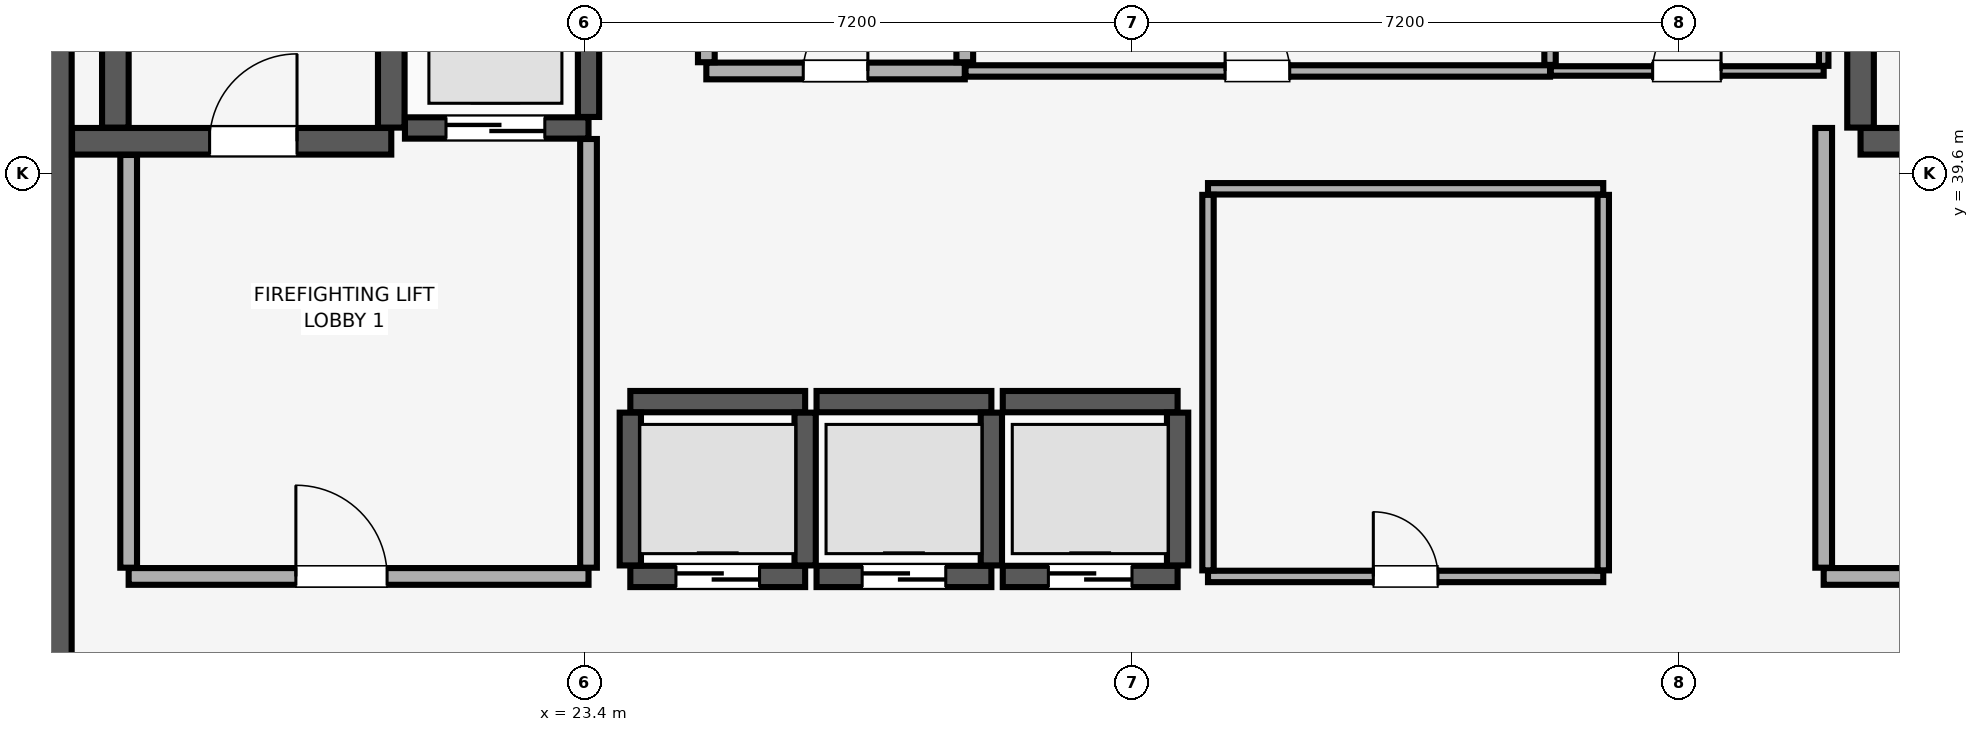
"""IFC4 building model, lengths in metres.
Left out: names, types, materials, properties, quantities, classifications, styles, units other than length and angle.
Written with IfcOpenShell. Run it as: python <this file> out.ifc"""

import sys

from ifc_helpers import new_model, si_unit, direction, frame, frame_2d, origin, place, context, subcontext, project, spatial, rectangle, extrude, element, fill, save


model = new_model("IFC4")
c1 = context("Model", 3, precision=1e-05, world=origin(), true_north=direction((0.0, 1.0)))
c2 = subcontext(c1, "Body", "Model", "MODEL_VIEW")
j1 = project(units=[si_unit("LENGTHUNIT", "METRE"), si_unit("PLANEANGLEUNIT", "RADIAN")], contexts=[c1])
p1 = place(None, origin())
s1 = spatial("IfcSite", under=j1, at=p1, CompositionType="ELEMENT")
p2 = place(p1, origin())
s2 = spatial("IfcBuilding", under=s1, at=p2, CompositionType="ELEMENT")
p3 = place(p2, frame((0.0, 0.0, 224.35)))
s3 = spatial("IfcBuildingStorey", under=s2, at=p3, CompositionType="ELEMENT", Elevation=224.35)
p4 = place(p3, frame((16.2, 29.4, 0.0), z_axis=(0.0, 0.0, 1.0), x_axis=(0.0, 1.0, 0.0)))
e1 = element("IfcWall", 1, at=p4, inside=s3, PredefinedType="SHEAR", context=c2, shape_type="SweptSolid", body=[
    extrude(rectangle(XDim=19.2, YDim=0.9, at=frame_2d((9.6, 0.0))), origin(), (0.0, 0.0, 1.0), 4.52),
])
p5 = place(p3, frame((16.655, 40.025, 0.0), z_axis=(0.0, 0.0, 1.0), x_axis=(1.0, 0.0, 0.0)))
e2 = element("IfcWall", 2, at=p5, inside=s3, PredefinedType="SHEAR", context=c2, shape_type="SweptSolid", body=[
    extrude(rectangle(XDim=4.2, YDim=0.35, at=frame_2d((2.1, 0.0))), origin(), (0.0, 0.0, 1.0), 4.52),
])
p6 = place(p5, frame((1.81, 0.0, 0.0)))
e3 = element("IfcOpeningElement", 3, at=p6, cuts=e2, PredefinedType="OPENING", context=c2, shape_type="SweptSolid", body=[
    extrude(rectangle(XDim=1.15, YDim=2.15, at=frame_2d((0.575, 1.075))), frame((0.0, 0.185, 0.0), z_axis=(0.0, -1.0, 0.0), x_axis=(1.0, 0.0, 0.0)), (0.0, 0.0, 1.0), 0.37),
])
for number, where, z_axis, x_axis in (
    (4, (17.225, 40.205, 0.0), (0.0, 0.0, 1.0), (0.0, 1.0, 0.0)),
    (5, (20.855, 40.205, 0.0), (0.0, 0.0, 1.0), (0.0, 1.0, 0.0)),
):
    element("IfcWall", number, at=place(p3, frame(where, z_axis=z_axis, x_axis=x_axis)), inside=s3, PredefinedType="SHEAR", context=c2, shape_type="SweptSolid", body=[
        extrude(rectangle(XDim=8.09, YDim=0.35, at=frame_2d((4.045, 0.0))), origin(), (0.0, 0.0, 1.0), 4.52),
    ])
p7 = place(p3, frame((40.185, 40.025, 0.0), z_axis=(0.0, 0.0, 1.0), x_axis=(1.0, 0.0, 0.0)))
e6 = element("IfcWall", 6, at=p7, inside=s3, PredefinedType="SHEAR", context=c2, shape_type="SweptSolid", body=[
    extrude(rectangle(XDim=3.63, YDim=0.35, at=frame_2d((1.815, 0.0))), origin(), (0.0, 0.0, 1.0), 4.52),
])
p8 = place(p7, frame((1.24, 0.0, 0.0)))
e7 = element("IfcOpeningElement", 7, at=p8, cuts=e6, PredefinedType="OPENING", context=c2, shape_type="SweptSolid", body=[
    extrude(rectangle(XDim=1.15, YDim=2.15, at=frame_2d((0.575, 1.075))), frame((0.0, 0.185, 0.0), z_axis=(0.0, -1.0, 0.0), x_axis=(1.0, 0.0, 0.0)), (0.0, 0.0, 1.0), 0.37),
])
p9 = place(p3, frame((40.185, 40.205, 0.0), z_axis=(0.0, 0.0, 1.0), x_axis=(0.0, 1.0, 0.0)))
e8 = element("IfcWall", 8, at=p9, inside=s3, PredefinedType="SHEAR", context=c2, shape_type="SweptSolid", body=[
    extrude(rectangle(XDim=8.09, YDim=0.35, at=frame_2d((4.045, 0.0))), origin(), (0.0, 0.0, 1.0), 4.52),
])
p10 = place(p3, frame((24.0, 34.3, 0.0), z_axis=(0.0, 0.0, 1.0), x_axis=(1.0, 0.0, 0.0)))
e9 = element("IfcWall", 9, at=p10, inside=s3, PredefinedType="SHEAR", context=c2, shape_type="SweptSolid", body=[
    extrude(rectangle(XDim=2.3, YDim=0.28, at=frame_2d((1.15, 0.0))), origin(), (0.0, 0.0, 1.0), 4.52),
])
p11 = place(p10, frame((0.6, 0.0, 0.0)))
e10 = element("IfcOpeningElement", 10, at=p11, cuts=e9, PredefinedType="OPENING", context=c2, shape_type="SweptSolid", body=[
    extrude(rectangle(XDim=1.1, YDim=2.2, at=frame_2d((0.55, 1.1))), frame((0.0, 0.15, 0.0), z_axis=(0.0, -1.0, 0.0), x_axis=(1.0, 0.0, 0.0)), (0.0, 0.0, 1.0), 0.3),
])
p12 = place(p3, frame((24.0, 36.6, 0.0), z_axis=(0.0, 0.0, 1.0), x_axis=(1.0, 0.0, 0.0)))
e11 = element("IfcWall", 11, at=p12, inside=s3, PredefinedType="SHEAR", context=c2, shape_type="SweptSolid", body=[
    extrude(rectangle(XDim=2.3, YDim=0.28, at=frame_2d((1.15, 0.0))), origin(), (0.0, 0.0, 1.0), 4.52),
])
for number, where, z_axis, x_axis in (
    (12, (24.0, 34.445, 0.0), (0.0, 0.0, 1.0), (0.0, 1.0, 0.0)),
    (13, (26.3, 34.445, 0.0), (0.0, 0.0, 1.0), (0.0, 1.0, 0.0)),
):
    element("IfcWall", number, at=place(p3, frame(where, z_axis=z_axis, x_axis=x_axis)), inside=s3, PredefinedType="SHEAR", context=c2, shape_type="SweptSolid", body=[
        extrude(rectangle(XDim=2.01, YDim=0.28, at=frame_2d((1.005, 0.0))), origin(), (0.0, 0.0, 1.0), 4.52),
    ])
p13 = place(p3, frame((26.45, 34.3, 0.0), z_axis=(0.0, 0.0, 1.0), x_axis=(1.0, 0.0, 0.0)))
e14 = element("IfcWall", 14, at=p13, inside=s3, PredefinedType="SHEAR", context=c2, shape_type="SweptSolid", body=[
    extrude(rectangle(XDim=2.3, YDim=0.28, at=frame_2d((1.15, 0.0))), origin(), (0.0, 0.0, 1.0), 4.52),
])
p14 = place(p13, frame((0.6, 0.0, 0.0)))
e15 = element("IfcOpeningElement", 15, at=p14, cuts=e14, PredefinedType="OPENING", context=c2, shape_type="SweptSolid", body=[
    extrude(rectangle(XDim=1.1, YDim=2.2, at=frame_2d((0.55, 1.1))), frame((0.0, 0.15, 0.0), z_axis=(0.0, -1.0, 0.0), x_axis=(1.0, 0.0, 0.0)), (0.0, 0.0, 1.0), 0.3),
])
p15 = place(p3, frame((26.45, 36.6, 0.0), z_axis=(0.0, 0.0, 1.0), x_axis=(1.0, 0.0, 0.0)))
e16 = element("IfcWall", 16, at=p15, inside=s3, PredefinedType="SHEAR", context=c2, shape_type="SweptSolid", body=[
    extrude(rectangle(XDim=2.3, YDim=0.28, at=frame_2d((1.15, 0.0))), origin(), (0.0, 0.0, 1.0), 4.52),
])
p16 = place(p3, frame((28.75, 34.445, 0.0), z_axis=(0.0, 0.0, 1.0), x_axis=(0.0, 1.0, 0.0)))
e17 = element("IfcWall", 17, at=p16, inside=s3, PredefinedType="SHEAR", context=c2, shape_type="SweptSolid", body=[
    extrude(rectangle(XDim=2.01, YDim=0.28, at=frame_2d((1.005, 0.0))), origin(), (0.0, 0.0, 1.0), 4.52),
])
p17 = place(p3, frame((28.9, 34.3, 0.0), z_axis=(0.0, 0.0, 1.0), x_axis=(1.0, 0.0, 0.0)))
e18 = element("IfcWall", 18, at=p17, inside=s3, PredefinedType="SHEAR", context=c2, shape_type="SweptSolid", body=[
    extrude(rectangle(XDim=2.3, YDim=0.28, at=frame_2d((1.15, 0.0))), origin(), (0.0, 0.0, 1.0), 4.52),
])
p18 = place(p17, frame((0.6, 0.0, 0.0)))
e19 = element("IfcOpeningElement", 19, at=p18, cuts=e18, PredefinedType="OPENING", context=c2, shape_type="SweptSolid", body=[
    extrude(rectangle(XDim=1.1, YDim=2.2, at=frame_2d((0.55, 1.1))), frame((0.0, 0.15, 0.0), z_axis=(0.0, -1.0, 0.0), x_axis=(1.0, 0.0, 0.0)), (0.0, 0.0, 1.0), 0.3),
])
p19 = place(p3, frame((28.9, 36.6, 0.0), z_axis=(0.0, 0.0, 1.0), x_axis=(1.0, 0.0, 0.0)))
e20 = element("IfcWall", 20, at=p19, inside=s3, PredefinedType="SHEAR", context=c2, shape_type="SweptSolid", body=[
    extrude(rectangle(XDim=2.3, YDim=0.28, at=frame_2d((1.15, 0.0))), origin(), (0.0, 0.0, 1.0), 4.52),
])
p20 = place(p3, frame((31.2, 34.445, 0.0), z_axis=(0.0, 0.0, 1.0), x_axis=(0.0, 1.0, 0.0)))
e21 = element("IfcWall", 21, at=p20, inside=s3, PredefinedType="SHEAR", context=c2, shape_type="SweptSolid", body=[
    extrude(rectangle(XDim=2.01, YDim=0.28, at=frame_2d((1.005, 0.0))), origin(), (0.0, 0.0, 1.0), 4.52),
])
p21 = place(p3, frame((21.035, 40.2, 0.0), z_axis=(0.0, 0.0, 1.0), x_axis=(1.0, 0.0, 0.0)))
e22 = element("IfcWall", 22, at=p21, inside=s3, PredefinedType="SHEAR", context=c2, shape_type="SweptSolid", body=[
    extrude(rectangle(XDim=2.415, YDim=0.28, at=frame_2d((1.208, 0.0))), origin(), (0.0, 0.0, 1.0), 4.52),
])
p22 = place(p21, frame((0.54, 0.0, 0.0)))
e23 = element("IfcOpeningElement", 23, at=p22, cuts=e22, PredefinedType="OPENING", context=c2, shape_type="SweptSolid", body=[
    extrude(rectangle(XDim=1.3, YDim=2.3, at=frame_2d((0.65, 1.15))), frame((0.0, 0.15, 0.0), z_axis=(0.0, -1.0, 0.0), x_axis=(1.0, 0.0, 0.0)), (0.0, 0.0, 1.0), 0.3),
])
p23 = place(p3, frame((23.45, 40.345, 0.0), z_axis=(0.0, 0.0, 1.0), x_axis=(0.0, 1.0, 0.0)))
e24 = element("IfcWall", 24, at=p23, inside=s3, PredefinedType="SHEAR", context=c2, shape_type="SweptSolid", body=[
    extrude(rectangle(XDim=2.81, YDim=0.28, at=frame_2d((1.405, 0.0))), origin(), (0.0, 0.0, 1.0), 4.52),
])
p24 = place(p3, frame((17.4, 34.3, 0.0), z_axis=(0.0, 0.0, 1.0), x_axis=(1.0, 0.0, 0.0)))
e25 = element("IfcWall", 25, at=p24, inside=s3, PredefinedType="PARTITIONING", context=c2, shape_type="SweptSolid", body=[
    extrude(rectangle(XDim=6.05, YDim=0.22, at=frame_2d((3.025, 0.0))), origin(), (0.0, 0.0, 1.0), 4.52),
])
p25 = place(p24, frame((2.2, 0.0, 0.0)))
e26 = element("IfcOpeningElement", 26, at=p25, cuts=e25, PredefinedType="OPENING", context=c2, shape_type="SweptSolid", body=[
    extrude(rectangle(XDim=1.2, YDim=2.15, at=frame_2d((0.6, 1.075))), frame((0.0, 0.12, 0.0), z_axis=(0.0, -1.0, 0.0), x_axis=(1.0, 0.0, 0.0)), (0.0, 0.0, 1.0), 0.24),
])
p26 = place(p3, frame((17.4, 34.415, 0.0), z_axis=(0.0, 0.0, 1.0), x_axis=(0.0, 1.0, 0.0)))
e27 = element("IfcWall", 27, at=p26, inside=s3, PredefinedType="PARTITIONING", context=c2, shape_type="SweptSolid", body=[
    extrude(rectangle(XDim=5.43, YDim=0.22, at=frame_2d((2.715, 0.0))), origin(), (0.0, 0.0, 1.0), 4.52),
])
p27 = place(p3, frame((23.45, 34.415, 0.0), z_axis=(0.0, 0.0, 1.0), x_axis=(0.0, 1.0, 0.0)))
e28 = element("IfcWall", 28, at=p27, inside=s3, PredefinedType="PARTITIONING", context=c2, shape_type="SweptSolid", body=[
    extrude(rectangle(XDim=5.64, YDim=0.22, at=frame_2d((2.82, 0.0))), origin(), (0.0, 0.0, 1.0), 4.52),
])
p28 = place(p3, frame((39.7, 34.3, 0.0), z_axis=(0.0, 0.0, 1.0), x_axis=(1.0, 0.0, 0.0)))
e29 = element("IfcWall", 29, at=p28, inside=s3, PredefinedType="PARTITIONING", context=c2, shape_type="SweptSolid", body=[
    extrude(rectangle(XDim=4.6, YDim=0.22, at=frame_2d((2.3, 0.0))), origin(), (0.0, 0.0, 1.0), 4.52),
])
p29 = place(p28, frame((1.7, 0.0, 0.0)))
e30 = element("IfcOpeningElement", 30, at=p29, cuts=e29, PredefinedType="OPENING", context=c2, shape_type="SweptSolid", body=[
    extrude(rectangle(XDim=1.2, YDim=2.15, at=frame_2d((0.6, 1.075))), frame((0.0, 0.12, 0.0), z_axis=(0.0, -1.0, 0.0), x_axis=(1.0, 0.0, 0.0)), (0.0, 0.0, 1.0), 0.24),
])
p30 = place(p3, frame((39.7, 34.415, 0.0), z_axis=(0.0, 0.0, 1.0), x_axis=(0.0, 1.0, 0.0)))
e31 = element("IfcWall", 31, at=p30, inside=s3, PredefinedType="PARTITIONING", context=c2, shape_type="SweptSolid", body=[
    extrude(rectangle(XDim=5.785, YDim=0.22, at=frame_2d((2.893, 0.0))), origin(), (0.0, 0.0, 1.0), 4.52),
])
p31 = place(p3, frame((31.6, 34.3, 0.0), z_axis=(0.0, 0.0, 1.0), x_axis=(1.0, 0.0, 0.0)))
e32 = element("IfcWall", 32, at=p31, inside=s3, PredefinedType="PARTITIONING", context=c2, shape_type="SweptSolid", body=[
    extrude(rectangle(XDim=5.2, YDim=0.15, at=frame_2d((2.6, 0.0))), origin(), (0.0, 0.0, 1.0), 4.52),
])
p32 = place(p31, frame((2.175, 0.0, 0.0)))
e33 = element("IfcOpeningElement", 33, at=p32, cuts=e32, PredefinedType="OPENING", context=c2, shape_type="SweptSolid", body=[
    extrude(rectangle(XDim=0.85, YDim=2.1, at=frame_2d((0.425, 1.05))), frame((0.0, 0.085, 0.0), z_axis=(0.0, -1.0, 0.0), x_axis=(1.0, 0.0, 0.0)), (0.0, 0.0, 1.0), 0.17),
])
p33 = place(p3, frame((31.6, 39.4, 0.0), z_axis=(0.0, 0.0, 1.0), x_axis=(1.0, 0.0, 0.0)))
e34 = element("IfcWall", 34, at=p33, inside=s3, PredefinedType="PARTITIONING", context=c2, shape_type="SweptSolid", body=[
    extrude(rectangle(XDim=5.2, YDim=0.15, at=frame_2d((2.6, 0.0))), origin(), (0.0, 0.0, 1.0), 4.52),
])
for number, where, z_axis, x_axis in (
    (35, (31.6, 34.38, 0.0), (0.0, 0.0, 1.0), (0.0, 1.0, 0.0)),
    (36, (36.8, 34.38, 0.0), (0.0, 0.0, 1.0), (0.0, 1.0, 0.0)),
):
    element("IfcWall", number, at=place(p3, frame(where, z_axis=z_axis, x_axis=x_axis)), inside=s3, PredefinedType="PARTITIONING", context=c2, shape_type="SweptSolid", body=[
        extrude(rectangle(XDim=4.94, YDim=0.15, at=frame_2d((2.47, 0.0))), origin(), (0.0, 0.0, 1.0), 4.52),
    ])
p34 = place(p3, frame((25.0, 40.95, 0.0), z_axis=(0.0, 0.0, 1.0), x_axis=(1.0, 0.0, 0.0)))
e37 = element("IfcWall", 37, at=p34, inside=s3, PredefinedType="PARTITIONING", context=c2, shape_type="SweptSolid", body=[
    extrude(rectangle(XDim=3.4, YDim=0.22, at=frame_2d((1.7, 0.0))), origin(), (0.0, 0.0, 1.0), 4.52),
])
p35 = place(p34, frame((1.275, 0.0, 0.0)))
e38 = element("IfcOpeningElement", 38, at=p35, cuts=e37, PredefinedType="OPENING", context=c2, shape_type="SweptSolid", body=[
    extrude(rectangle(XDim=0.85, YDim=2.1, at=frame_2d((0.425, 1.05))), frame((0.0, 0.12, 0.0), z_axis=(0.0, -1.0, 0.0), x_axis=(1.0, 0.0, 0.0)), (0.0, 0.0, 1.0), 0.24),
])
for number, where, z_axis, x_axis in (
    (39, (25.0, 41.065, 0.0), (0.0, 0.0, 1.0), (0.0, 1.0, 0.0)),
    (40, (28.4, 41.065, 0.0), (0.0, 0.0, 1.0), (0.0, 1.0, 0.0)),
):
    element("IfcWall", number, at=place(p3, frame(where, z_axis=z_axis, x_axis=x_axis)), inside=s3, PredefinedType="PARTITIONING", context=c2, shape_type="SweptSolid", body=[
        extrude(rectangle(XDim=7.785, YDim=0.22, at=frame_2d((3.893, 0.0))), origin(), (0.0, 0.0, 1.0), 4.52),
    ])
p36 = place(p3, frame((28.41, 40.95, 0.0), z_axis=(0.0, 0.0, 1.0), x_axis=(1.0, 0.0, 0.0)))
e41 = element("IfcWall", 41, at=p36, inside=s3, PredefinedType="PARTITIONING", context=c2, shape_type="SweptSolid", body=[
    extrude(rectangle(XDim=7.69, YDim=0.15, at=frame_2d((3.845, 0.0))), origin(), (0.0, 0.0, 1.0), 4.52),
])
p37 = place(p36, frame((3.415, 0.0, 0.0)))
e42 = element("IfcOpeningElement", 42, at=p37, cuts=e41, PredefinedType="OPENING", context=c2, shape_type="SweptSolid", body=[
    extrude(rectangle(XDim=0.85, YDim=2.1, at=frame_2d((0.425, 1.05))), frame((0.0, 0.085, 0.0), z_axis=(0.0, -1.0, 0.0), x_axis=(1.0, 0.0, 0.0)), (0.0, 0.0, 1.0), 0.17),
])
p38 = place(p3, frame((36.1, 41.03, 0.0), z_axis=(0.0, 0.0, 1.0), x_axis=(0.0, 1.0, 0.0)))
e43 = element("IfcWall", 43, at=p38, inside=s3, PredefinedType="PARTITIONING", context=c2, shape_type="SweptSolid", body=[
    extrude(rectangle(XDim=7.82, YDim=0.15, at=frame_2d((3.91, 0.0))), origin(), (0.0, 0.0, 1.0), 4.52),
])
p39 = place(p3, frame((36.11, 40.95, 0.0), z_axis=(0.0, 0.0, 1.0), x_axis=(1.0, 0.0, 0.0)))
e44 = element("IfcWall", 44, at=p39, inside=s3, PredefinedType="PARTITIONING", context=c2, shape_type="SweptSolid", body=[
    extrude(rectangle(XDim=3.59, YDim=0.125, at=frame_2d((1.795, 0.0))), origin(), (0.0, 0.0, 1.0), 4.52),
])
p40 = place(p39, frame((1.34, 0.0, 0.0)))
e45 = element("IfcOpeningElement", 45, at=p40, cuts=e44, PredefinedType="OPENING", context=c2, shape_type="SweptSolid", body=[
    extrude(rectangle(XDim=0.9, YDim=2.1, at=frame_2d((0.45, 1.05))), frame((0.0, 0.073, 0.0), z_axis=(0.0, -1.0, 0.0), x_axis=(1.0, 0.0, 0.0)), (0.0, 0.0, 1.0), 0.145),
])
p41 = place(p3, frame((39.7, 41.018, 0.0), z_axis=(0.0, 0.0, 1.0), x_axis=(0.0, 1.0, 0.0)))
e46 = element("IfcWall", 46, at=p41, inside=s3, PredefinedType="PARTITIONING", context=c2, shape_type="SweptSolid", body=[
    extrude(rectangle(XDim=3.715, YDim=0.125, at=frame_2d((1.857, 0.0))), origin(), (0.0, 0.0, 1.0), 4.52),
])
p42 = place(p6, origin())
e47 = element("IfcDoor", 47, at=p42, inside=s3, OperationType="SINGLE_SWING_RIGHT", PredefinedType="DOOR", context=c2, shape_type="SweptSolid", body=[
    extrude(rectangle(XDim=1.15, YDim=2.15, at=frame_2d((0.575, 1.075))), frame((0.0, 0.025, 0.0), z_axis=(0.0, -1.0, 0.0), x_axis=(1.0, 0.0, 0.0)), (0.0, 0.0, 1.0), 0.05),
])
fill(e3, e47)
p43 = place(p11, origin())
e48 = element("IfcDoor", 48, at=p43, inside=s3, OperationType="DOUBLE_DOOR_SLIDING", PredefinedType="DOOR", context=c2, shape_type="SweptSolid", body=[
    extrude(rectangle(XDim=1.1, YDim=2.2, at=frame_2d((0.55, 1.1))), frame((0.0, 0.025, 0.0), z_axis=(0.0, -1.0, 0.0), x_axis=(1.0, 0.0, 0.0)), (0.0, 0.0, 1.0), 0.05),
])
fill(e10, e48)
p44 = place(p14, origin())
e49 = element("IfcDoor", 49, at=p44, inside=s3, OperationType="DOUBLE_DOOR_SLIDING", PredefinedType="DOOR", context=c2, shape_type="SweptSolid", body=[
    extrude(rectangle(XDim=1.1, YDim=2.2, at=frame_2d((0.55, 1.1))), frame((0.0, 0.025, 0.0), z_axis=(0.0, -1.0, 0.0), x_axis=(1.0, 0.0, 0.0)), (0.0, 0.0, 1.0), 0.05),
])
fill(e15, e49)
p45 = place(p18, origin())
e50 = element("IfcDoor", 50, at=p45, inside=s3, OperationType="DOUBLE_DOOR_SLIDING", PredefinedType="DOOR", context=c2, shape_type="SweptSolid", body=[
    extrude(rectangle(XDim=1.1, YDim=2.2, at=frame_2d((0.55, 1.1))), frame((0.0, 0.025, 0.0), z_axis=(0.0, -1.0, 0.0), x_axis=(1.0, 0.0, 0.0)), (0.0, 0.0, 1.0), 0.05),
])
fill(e19, e50)
p46 = place(p22, origin())
e51 = element("IfcDoor", 51, at=p46, inside=s3, OperationType="DOUBLE_DOOR_SLIDING", PredefinedType="DOOR", context=c2, shape_type="SweptSolid", body=[
    extrude(rectangle(XDim=1.3, YDim=2.3, at=frame_2d((0.65, 1.15))), frame((0.0, 0.025, 0.0), z_axis=(0.0, -1.0, 0.0), x_axis=(1.0, 0.0, 0.0)), (0.0, 0.0, 1.0), 0.05),
])
fill(e23, e51)
p47 = place(p25, origin())
e52 = element("IfcDoor", 52, at=p47, inside=s3, OperationType="SINGLE_SWING_LEFT", PredefinedType="DOOR", context=c2, shape_type="SweptSolid", body=[
    extrude(rectangle(XDim=1.2, YDim=2.15, at=frame_2d((0.6, 1.075))), frame((0.0, 0.025, 0.0), z_axis=(0.0, -1.0, 0.0), x_axis=(1.0, 0.0, 0.0)), (0.0, 0.0, 1.0), 0.05),
])
fill(e26, e52)
p48 = place(p32, origin())
e53 = element("IfcDoor", 53, at=p48, inside=s3, OperationType="SINGLE_SWING_LEFT", PredefinedType="DOOR", context=c2, shape_type="SweptSolid", body=[
    extrude(rectangle(XDim=0.85, YDim=2.1, at=frame_2d((0.425, 1.05))), frame((0.0, 0.025, 0.0), z_axis=(0.0, -1.0, 0.0), x_axis=(1.0, 0.0, 0.0)), (0.0, 0.0, 1.0), 0.05),
])
fill(e33, e53)
p49 = place(p35, origin())
e54 = element("IfcDoor", 54, at=p49, inside=s3, OperationType="SINGLE_SWING_RIGHT", PredefinedType="DOOR", context=c2, shape_type="SweptSolid", body=[
    extrude(rectangle(XDim=0.85, YDim=2.1, at=frame_2d((0.425, 1.05))), frame((0.0, 0.025, 0.0), z_axis=(0.0, -1.0, 0.0), x_axis=(1.0, 0.0, 0.0)), (0.0, 0.0, 1.0), 0.05),
])
fill(e38, e54)
p50 = place(p37, origin())
e55 = element("IfcDoor", 55, at=p50, inside=s3, OperationType="SINGLE_SWING_LEFT", PredefinedType="DOOR", context=c2, shape_type="SweptSolid", body=[
    extrude(rectangle(XDim=0.85, YDim=2.1, at=frame_2d((0.425, 1.05))), frame((0.0, 0.025, 0.0), z_axis=(0.0, -1.0, 0.0), x_axis=(1.0, 0.0, 0.0)), (0.0, 0.0, 1.0), 0.05),
])
fill(e42, e55)
p51 = place(p40, origin())
e56 = element("IfcDoor", 56, at=p51, inside=s3, OperationType="SINGLE_SWING_RIGHT", PredefinedType="DOOR", context=c2, shape_type="SweptSolid", body=[
    extrude(rectangle(XDim=0.9, YDim=2.1, at=frame_2d((0.45, 1.05))), frame((0.0, 0.025, 0.0), z_axis=(0.0, -1.0, 0.0), x_axis=(1.0, 0.0, 0.0)), (0.0, 0.0, 1.0), 0.05),
])
fill(e45, e56)
save(model, sys.argv[1])
